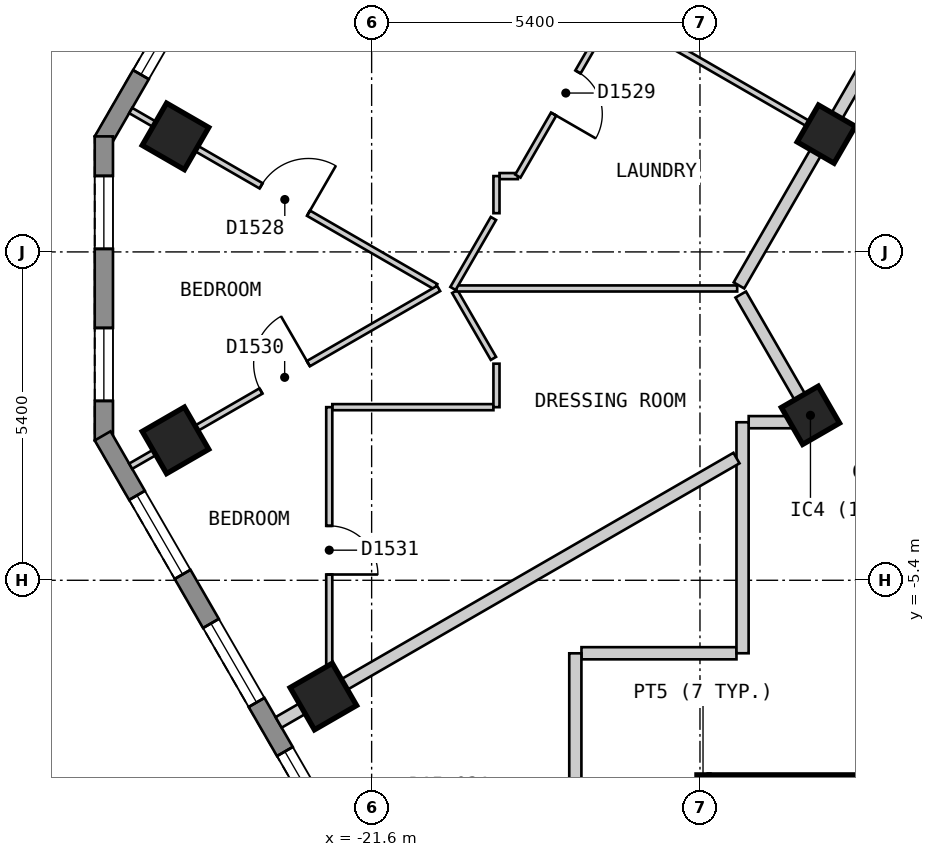
"""IFC4 building model, lengths in metres.
Left out: names, types, materials, properties, quantities, classifications, styles, units other than length and angle.
Written with IfcOpenShell. Run it as: python <this file> out.ifc"""

import sys

from ifc_helpers import new_model, si_unit, direction, frame, frame_2d, origin, origin_2d, place, context, subcontext, project, spatial, polyline, rectangle, outline, extrude, element, fill, save


model = new_model("IFC4")
c1 = context("Model", 3, precision=1e-05, world=origin(), true_north=direction((0.0, 1.0)))
c2 = subcontext(c1, "Body", "Model", "MODEL_VIEW")
j1 = project(units=[si_unit("LENGTHUNIT", "METRE"), si_unit("PLANEANGLEUNIT", "RADIAN")], contexts=[c1])
p1 = place(None, origin())
s1 = spatial("IfcSite", under=j1, at=p1, CompositionType="ELEMENT")
p2 = place(p1, origin())
s2 = spatial("IfcBuilding", under=s1, at=p2, CompositionType="ELEMENT")
p3 = place(p2, frame((0.0, 0.0, 184.2)))
s3 = spatial("IfcBuildingStorey", under=s2, at=p3, CompositionType="ELEMENT", Elevation=184.2)
for number, where, z_axis, x_axis in (
    (1, (-24.826, 1.9, 0.0), (0.0, 0.0, 1.0), (-0.5, -0.866, 0.0)),
    (2, (-24.826, -3.099, 0.0), (0.0, 0.0, 1.0), (0.5, -0.866, 0.0)),
    (3, (-22.394, -7.312, 0.0), (0.0, 0.0, 1.0), (0.5, -0.866, 0.0)),
):
    element("IfcColumn", number, at=place(p3, frame(where, z_axis=z_axis, x_axis=x_axis)), inside=s3, PredefinedType="COLUMN", context=c2, shape_type="SweptSolid", body=[
        extrude(rectangle(XDim=0.8, YDim=0.8, at=origin_2d()), origin(), (0.0, 0.0, 1.0), 3.0),
    ])
for number, where, z_axis, x_axis in (
    (4, (-14.383, -2.687, 0.0), (0.0, 0.0, 1.0), (0.5, -0.866, 0.0)),
    (5, (-14.123, 1.937, 0.0), (0.0, 0.0, 1.0), (-0.5, -0.866, 0.0)),
):
    element("IfcColumn", number, at=place(p3, frame(where, z_axis=z_axis, x_axis=x_axis)), inside=s3, PredefinedType="COLUMN", context=c2, shape_type="SweptSolid", body=[
        extrude(rectangle(XDim=0.7, YDim=0.7, at=origin_2d()), origin(), (0.0, 0.0, 1.0), 3.0),
    ])
p4 = place(p3, frame((-14.592, 21.625, 0.0), z_axis=(0.0, 0.0, 1.0), x_axis=(-0.500010537973, -0.866019319597, 0.0)))
e6 = element("IfcWall", 6, at=p4, inside=s3, PredefinedType="SOLIDWALL", context=c2, shape_type="SweptSolid", body=[
    extrude(outline(polyline([(0.0, -0.15), (22.863, -0.15), (22.783, 0.15), (0.08, 0.15), (0.0, -0.15)])), origin(), (0.0, 0.0, 1.0), 2.7),
])
p5 = place(p4, frame((1.259, 0.0, 0.15)))
e7 = element("IfcOpeningElement", 7, at=p5, cuts=e6, PredefinedType="OPENING", context=c2, shape_type="SweptSolid", body=[
    extrude(rectangle(XDim=1.5, YDim=2.1, at=frame_2d((0.75, 1.05))), frame((0.0, 0.16, 0.0), z_axis=(0.0, -1.0, 0.0), x_axis=(1.0, 0.0, 0.0)), (0.0, 0.0, 1.0), 0.32),
])
p6 = place(p4, frame((3.952, 0.0, 0.15)))
e8 = element("IfcOpeningElement", 8, at=p6, cuts=e6, PredefinedType="OPENING", context=c2, shape_type="SweptSolid", body=[
    extrude(rectangle(XDim=1.5, YDim=2.1, at=frame_2d((0.75, 1.05))), frame((0.0, 0.16, 0.0), z_axis=(0.0, -1.0, 0.0), x_axis=(1.0, 0.0, 0.0)), (0.0, 0.0, 1.0), 0.32),
])
p7 = place(p4, frame((6.644, 0.0, 0.15)))
e9 = element("IfcOpeningElement", 9, at=p7, cuts=e6, PredefinedType="OPENING", context=c2, shape_type="SweptSolid", body=[
    extrude(rectangle(XDim=1.5, YDim=2.1, at=frame_2d((0.75, 1.05))), frame((0.0, 0.16, 0.0), z_axis=(0.0, -1.0, 0.0), x_axis=(1.0, 0.0, 0.0)), (0.0, 0.0, 1.0), 0.32),
])
p8 = place(p4, frame((9.335, 0.0, 0.15)))
e10 = element("IfcOpeningElement", 10, at=p8, cuts=e6, PredefinedType="OPENING", context=c2, shape_type="SweptSolid", body=[
    extrude(rectangle(XDim=1.5, YDim=2.1, at=frame_2d((0.75, 1.05))), frame((0.0, 0.16, 0.0), z_axis=(0.0, -1.0, 0.0), x_axis=(1.0, 0.0, 0.0)), (0.0, 0.0, 1.0), 0.32),
])
p9 = place(p4, frame((12.028, 0.0, 0.15)))
e11 = element("IfcOpeningElement", 11, at=p9, cuts=e6, PredefinedType="OPENING", context=c2, shape_type="SweptSolid", body=[
    extrude(rectangle(XDim=1.5, YDim=2.1, at=frame_2d((0.75, 1.05))), frame((0.0, 0.16, 0.0), z_axis=(0.0, -1.0, 0.0), x_axis=(1.0, 0.0, 0.0)), (0.0, 0.0, 1.0), 0.32),
])
p10 = place(p4, frame((14.72, 0.0, 0.15)))
e12 = element("IfcOpeningElement", 12, at=p10, cuts=e6, PredefinedType="OPENING", context=c2, shape_type="SweptSolid", body=[
    extrude(rectangle(XDim=1.5, YDim=2.1, at=frame_2d((0.75, 1.05))), frame((0.0, 0.16, 0.0), z_axis=(0.0, -1.0, 0.0), x_axis=(1.0, 0.0, 0.0)), (0.0, 0.0, 1.0), 0.32),
])
p11 = place(p4, frame((17.411, 0.0, 0.15)))
e13 = element("IfcOpeningElement", 13, at=p11, cuts=e6, PredefinedType="OPENING", context=c2, shape_type="SweptSolid", body=[
    extrude(rectangle(XDim=1.5, YDim=2.1, at=frame_2d((0.75, 1.05))), frame((0.0, 0.16, 0.0), z_axis=(0.0, -1.0, 0.0), x_axis=(1.0, 0.0, 0.0)), (0.0, 0.0, 1.0), 0.32),
])
p12 = place(p4, frame((20.104, 0.0, 0.15)))
e14 = element("IfcOpeningElement", 14, at=p12, cuts=e6, PredefinedType="OPENING", context=c2, shape_type="SweptSolid", body=[
    extrude(rectangle(XDim=1.5, YDim=2.1, at=frame_2d((0.75, 1.05))), frame((0.0, 0.16, 0.0), z_axis=(0.0, -1.0, 0.0), x_axis=(1.0, 0.0, 0.0)), (0.0, 0.0, 1.0), 0.32),
])
p13 = place(p3, frame((-26.004, 1.9, 0.0), z_axis=(0.0, 0.0, 1.0), x_axis=(0.0, -1.0, 0.0)))
e15 = element("IfcWall", 15, at=p13, inside=s3, PredefinedType="SOLIDWALL", context=c2, shape_type="SweptSolid", body=[
    extrude(outline(polyline([(0.0, -0.15), (5.0, -0.15), (4.92, 0.15), (0.08, 0.15), (0.0, -0.15)])), origin(), (0.0, 0.0, 1.0), 2.7),
])
p14 = place(p13, frame((0.65, 0.0, 0.15)))
e16 = element("IfcOpeningElement", 16, at=p14, cuts=e15, PredefinedType="OPENING", context=c2, shape_type="SweptSolid", body=[
    extrude(rectangle(XDim=1.2, YDim=2.1, at=frame_2d((0.6, 1.05))), frame((0.0, 0.16, 0.0), z_axis=(0.0, -1.0, 0.0), x_axis=(1.0, 0.0, 0.0)), (0.0, 0.0, 1.0), 0.32),
])
p15 = place(p13, frame((3.15, 0.0, 0.15)))
e17 = element("IfcOpeningElement", 17, at=p15, cuts=e15, PredefinedType="OPENING", context=c2, shape_type="SweptSolid", body=[
    extrude(rectangle(XDim=1.2, YDim=2.1, at=frame_2d((0.6, 1.05))), frame((0.0, 0.16, 0.0), z_axis=(0.0, -1.0, 0.0), x_axis=(1.0, 0.0, 0.0)), (0.0, 0.0, 1.0), 0.32),
])
p16 = place(p3, frame((-26.024, -3.025, 0.0), z_axis=(0.0, 0.0, 1.0), x_axis=(0.500018670445, -0.86601462413, 0.0)))
e18 = element("IfcWall", 18, at=p16, inside=s3, PredefinedType="SOLIDWALL", context=c2, shape_type="SweptSolid", body=[
    extrude(outline(polyline([(0.0, -0.15), (20.785, -0.15), (20.705, 0.15), (0.08, 0.15), (0.0, -0.15)])), origin(), (0.0, 0.0, 1.0), 2.7),
])
p17 = place(p16, frame((1.13, 0.0, 0.15)))
e19 = element("IfcOpeningElement", 19, at=p17, cuts=e18, PredefinedType="OPENING", context=c2, shape_type="SweptSolid", body=[
    extrude(rectangle(XDim=1.5, YDim=2.1, at=frame_2d((0.75, 1.05))), frame((0.0, 0.16, 0.0), z_axis=(0.0, -1.0, 0.0), x_axis=(1.0, 0.0, 0.0)), (0.0, 0.0, 1.0), 0.32),
])
p18 = place(p16, frame((3.562, 0.0, 0.15)))
e20 = element("IfcOpeningElement", 20, at=p18, cuts=e18, PredefinedType="OPENING", context=c2, shape_type="SweptSolid", body=[
    extrude(rectangle(XDim=1.5, YDim=2.1, at=frame_2d((0.75, 1.05))), frame((0.0, 0.16, 0.0), z_axis=(0.0, -1.0, 0.0), x_axis=(1.0, 0.0, 0.0)), (0.0, 0.0, 1.0), 0.32),
])
p19 = place(p16, frame((5.994, 0.0, 0.15)))
e21 = element("IfcOpeningElement", 21, at=p19, cuts=e18, PredefinedType="OPENING", context=c2, shape_type="SweptSolid", body=[
    extrude(rectangle(XDim=1.5, YDim=2.1, at=frame_2d((0.75, 1.05))), frame((0.0, 0.16, 0.0), z_axis=(0.0, -1.0, 0.0), x_axis=(1.0, 0.0, 0.0)), (0.0, 0.0, 1.0), 0.32),
])
p20 = place(p16, frame((8.425, 0.0, 0.15)))
e22 = element("IfcOpeningElement", 22, at=p20, cuts=e18, PredefinedType="OPENING", context=c2, shape_type="SweptSolid", body=[
    extrude(rectangle(XDim=1.5, YDim=2.1, at=frame_2d((0.75, 1.05))), frame((0.0, 0.16, 0.0), z_axis=(0.0, -1.0, 0.0), x_axis=(1.0, 0.0, 0.0)), (0.0, 0.0, 1.0), 0.32),
])
p21 = place(p16, frame((10.857, 0.0, 0.15)))
e23 = element("IfcOpeningElement", 23, at=p21, cuts=e18, PredefinedType="OPENING", context=c2, shape_type="SweptSolid", body=[
    extrude(rectangle(XDim=1.5, YDim=2.1, at=frame_2d((0.75, 1.05))), frame((0.0, 0.16, 0.0), z_axis=(0.0, -1.0, 0.0), x_axis=(1.0, 0.0, 0.0)), (0.0, 0.0, 1.0), 0.32),
])
p22 = place(p16, frame((13.289, 0.0, 0.15)))
e24 = element("IfcOpeningElement", 24, at=p22, cuts=e18, PredefinedType="OPENING", context=c2, shape_type="SweptSolid", body=[
    extrude(rectangle(XDim=1.5, YDim=2.1, at=frame_2d((0.75, 1.05))), frame((0.0, 0.16, 0.0), z_axis=(0.0, -1.0, 0.0), x_axis=(1.0, 0.0, 0.0)), (0.0, 0.0, 1.0), 0.32),
])
p23 = place(p16, frame((15.722, 0.0, 0.15)))
e25 = element("IfcOpeningElement", 25, at=p23, cuts=e18, PredefinedType="OPENING", context=c2, shape_type="SweptSolid", body=[
    extrude(rectangle(XDim=1.5, YDim=2.1, at=frame_2d((0.75, 1.05))), frame((0.0, 0.16, 0.0), z_axis=(0.0, -1.0, 0.0), x_axis=(1.0, 0.0, 0.0)), (0.0, 0.0, 1.0), 0.32),
])
p24 = place(p16, frame((18.154, 0.0, 0.15)))
e26 = element("IfcOpeningElement", 26, at=p24, cuts=e18, PredefinedType="OPENING", context=c2, shape_type="SweptSolid", body=[
    extrude(rectangle(XDim=1.5, YDim=2.1, at=frame_2d((0.75, 1.05))), frame((0.0, 0.16, 0.0), z_axis=(0.0, -1.0, 0.0), x_axis=(1.0, 0.0, 0.0)), (0.0, 0.0, 1.0), 0.32),
])
p25 = place(p3, frame((-15.53, -0.701, 0.0), z_axis=(0.0, 0.0, 1.0), x_axis=(0.499972710878, -0.866041158593, 0.0)))
e27 = element("IfcWall", 27, at=p25, inside=s3, PredefinedType="PARTITIONING", context=c2, shape_type="SweptSolid", body=[
    extrude(rectangle(XDim=2.308, YDim=0.2, at=frame_2d((1.154, 0.0))), origin(), (0.0, 0.0, 1.0), 2.7),
])
p26 = place(p3, frame((-18.149, -6.6, 0.0), z_axis=(0.0, 0.0, 1.0), x_axis=(1.0, 0.0, 0.0)))
e28 = element("IfcWall", 28, at=p26, inside=s3, PredefinedType="PARTITIONING", context=c2, shape_type="SweptSolid", body=[
    extrude(rectangle(XDim=2.549, YDim=0.2, at=frame_2d((1.274, 0.0))), origin(), (0.0, 0.0, 1.0), 2.7),
])
p27 = place(p3, frame((-15.399, -2.8, 0.0), z_axis=(0.0, 0.0, 1.0), x_axis=(1.0, 0.0, 0.0)))
e29 = element("IfcWall", 29, at=p27, inside=s3, PredefinedType="PARTITIONING", context=c2, shape_type="SweptSolid", body=[
    extrude(rectangle(XDim=1.081, YDim=0.2, at=frame_2d((0.541, 0.0))), origin(), (0.0, 0.0, 1.0), 2.7),
])
p28 = place(p3, frame((-15.559, -0.551, 0.0), z_axis=(0.0, 0.0, 1.0), x_axis=(0.499964997208, 0.866045611713, 0.0)))
e30 = element("IfcWall", 30, at=p28, inside=s3, PredefinedType="PARTITIONING", context=c2, shape_type="SweptSolid", body=[
    extrude(rectangle(XDim=9.643, YDim=0.2, at=frame_2d((4.821, 0.0))), origin(), (0.0, 0.0, 1.0), 2.7),
])
p29 = place(p28, frame((5.088, 0.0, 0.0)))
e31 = element("IfcOpeningElement", 31, at=p29, cuts=e30, PredefinedType="OPENING", context=c2, shape_type="SweptSolid", body=[
    extrude(rectangle(XDim=1.0, YDim=2.1, at=frame_2d((0.5, 1.05))), frame((0.0, 0.11, 0.0), z_axis=(0.0, -1.0, 0.0), x_axis=(1.0, 0.0, 0.0)), (0.0, 0.0, 1.0), 0.22),
])
p30 = place(p3, frame((-15.5, -6.6, 0.0), z_axis=(0.0, 0.0, 1.0), x_axis=(0.0, 1.0, 0.0)))
e32 = element("IfcWall", 32, at=p30, inside=s3, PredefinedType="PARTITIONING", context=c2, shape_type="SweptSolid", body=[
    extrude(rectangle(XDim=3.799, YDim=0.2, at=frame_2d((1.899, 0.0))), origin(), (0.0, 0.0, 1.0), 2.7),
])
p31 = place(p3, frame((-18.25, -16.152, 0.0), z_axis=(0.0, 0.0, 1.0), x_axis=(0.0, 1.0, 0.0)))
e33 = element("IfcWall", 33, at=p31, inside=s3, PredefinedType="PARTITIONING", context=c2, shape_type="SweptSolid", body=[
    extrude(rectangle(XDim=9.551, YDim=0.2, at=frame_2d((4.775, 0.0))), origin(), (0.0, 0.0, 1.0), 2.7),
])
p32 = place(p31, frame((6.026, 0.0, 0.0)))
e34 = element("IfcOpeningElement", 34, at=p32, cuts=e33, PredefinedType="OPENING", context=c2, shape_type="SweptSolid", body=[
    extrude(rectangle(XDim=0.8, YDim=2.1, at=frame_2d((0.4, 1.05))), frame((0.0, 0.11, 0.0), z_axis=(0.0, -1.0, 0.0), x_axis=(1.0, 0.0, 0.0)), (0.0, 0.0, 1.0), 0.22),
])
p33 = place(p3, frame((-20.233, -0.651, 0.0), z_axis=(0.0, 0.0, 1.0), x_axis=(0.500498449207, -0.865737432679, 0.0)))
e35 = element("IfcWall", 35, at=p33, inside=s3, PredefinedType="PARTITIONING", context=c2, shape_type="SweptSolid", body=[
    extrude(rectangle(XDim=1.271, YDim=0.1, at=frame_2d((0.635, 0.0))), origin(), (0.0, 0.0, 1.0), 2.7),
])
p34 = place(p3, frame((-17.585, 3.936, 0.0), z_axis=(0.0, 0.0, 1.0), x_axis=(0.865979019114, -0.500080332001, 0.0)))
e36 = element("IfcWall", 36, at=p34, inside=s3, PredefinedType="PARTITIONING", context=c2, shape_type="SweptSolid", body=[
    extrude(rectangle(XDim=3.897, YDim=0.1, at=frame_2d((1.949, 0.0))), origin(), (0.0, 0.0, 1.0), 2.7),
])
p35 = place(p3, frame((-25.562, 2.325, 0.0), z_axis=(0.0, 0.0, 1.0), x_axis=(0.86599890761, -0.500045889912, 0.0)))
e37 = element("IfcWall", 37, at=p35, inside=s3, PredefinedType="PARTITIONING", context=c2, shape_type="SweptSolid", body=[
    extrude(rectangle(XDim=5.793, YDim=0.1, at=frame_2d((2.897, 0.0))), origin(), (0.0, 0.0, 1.0), 2.7),
])
p36 = place(p35, frame((2.476, 0.0, 0.0)))
e38 = element("IfcOpeningElement", 38, at=p36, cuts=e37, PredefinedType="OPENING", context=c2, shape_type="SweptSolid", body=[
    extrude(rectangle(XDim=0.9, YDim=2.1, at=frame_2d((0.45, 1.05))), frame((0.0, 0.06, 0.0), z_axis=(0.0, -1.0, 0.0), x_axis=(1.0, 0.0, 0.0)), (0.0, 0.0, 1.0), 0.12),
])
p37 = place(p3, frame((-20.204, -0.601, 0.0), z_axis=(0.0, 0.0, 1.0), x_axis=(1.0, 0.0, 0.0)))
e39 = element("IfcWall", 39, at=p37, inside=s3, PredefinedType="PARTITIONING", context=c2, shape_type="SweptSolid", body=[
    extrude(rectangle(XDim=4.616, YDim=0.1, at=frame_2d((2.308, 0.0))), origin(), (0.0, 0.0, 1.0), 2.7),
])
p38 = place(p3, frame((-22.247, -2.553, 0.0), z_axis=(0.0, 0.0, 1.0), x_axis=(1.0, 0.0, 0.0)))
e40 = element("IfcWall", 40, at=p38, inside=s3, PredefinedType="PARTITIONING", context=c2, shape_type="SweptSolid", body=[
    extrude(rectangle(XDim=2.65, YDim=0.1, at=frame_2d((1.325, 0.0))), origin(), (0.0, 0.0, 1.0), 2.7),
])
p39 = place(p3, frame((-19.497, 1.247, 0.0), z_axis=(0.0, 0.0, 1.0), x_axis=(1.0, 0.0, 0.0)))
e41 = element("IfcWall", 41, at=p39, inside=s3, PredefinedType="PARTITIONING", context=c2, shape_type="SweptSolid", body=[
    extrude(rectangle(XDim=0.302, YDim=0.1, at=frame_2d((0.151, 0.0))), origin(), (0.0, 0.0, 1.0), 2.7),
])
p40 = place(p3, frame((-20.262, -0.601, 0.0), z_axis=(0.0, 0.0, 1.0), x_axis=(0.500247001515, 0.86588275042, 0.0)))
e42 = element("IfcWall", 42, at=p40, inside=s3, PredefinedType="PARTITIONING", context=c2, shape_type="SweptSolid", body=[
    extrude(rectangle(XDim=1.329, YDim=0.1, at=frame_2d((0.665, 0.0))), origin(), (0.0, 0.0, 1.0), 2.7),
])
p41 = place(p3, frame((-19.195, 1.247, 0.0), z_axis=(0.0, 0.0, 1.0), x_axis=(0.499959862915, 0.866048575701, 0.0)))
e43 = element("IfcWall", 43, at=p41, inside=s3, PredefinedType="PARTITIONING", context=c2, shape_type="SweptSolid", body=[
    extrude(rectangle(XDim=7.566, YDim=0.1, at=frame_2d((3.783, 0.0))), origin(), (0.0, 0.0, 1.0), 2.7),
])
p42 = place(p41, frame((5.354, 0.0, 0.0)))
e44 = element("IfcOpeningElement", 44, at=p42, cuts=e43, PredefinedType="OPENING", context=c2, shape_type="SweptSolid", body=[
    extrude(rectangle(XDim=0.9, YDim=2.1, at=frame_2d((0.45, 1.05))), frame((0.0, 0.06, 0.0), z_axis=(0.0, -1.0, 0.0), x_axis=(1.0, 0.0, 0.0)), (0.0, 0.0, 1.0), 0.12),
])
p43 = place(p41, frame((1.177, 0.0, 0.0)))
e45 = element("IfcOpeningElement", 45, at=p43, cuts=e43, PredefinedType="OPENING", context=c2, shape_type="SweptSolid", body=[
    extrude(rectangle(XDim=0.8, YDim=2.1, at=frame_2d((0.4, 1.05))), frame((0.0, 0.06, 0.0), z_axis=(0.0, -1.0, 0.0), x_axis=(1.0, 0.0, 0.0)), (0.0, 0.0, 1.0), 0.12),
])
p44 = place(p3, frame((-19.547, -2.553, 0.0), z_axis=(0.0, 0.0, 1.0), x_axis=(0.0, 1.0, 0.0)))
e46 = element("IfcWall", 46, at=p44, inside=s3, PredefinedType="PARTITIONING", context=c2, shape_type="SweptSolid", body=[
    extrude(rectangle(XDim=0.715, YDim=0.1, at=frame_2d((0.357, 0.0))), origin(), (0.0, 0.0, 1.0), 2.7),
])
p45 = place(p3, frame((-19.547, 0.637, 0.0), z_axis=(0.0, 0.0, 1.0), x_axis=(0.0, 1.0, 0.0)))
e47 = element("IfcWall", 47, at=p45, inside=s3, PredefinedType="PARTITIONING", context=c2, shape_type="SweptSolid", body=[
    extrude(rectangle(XDim=0.61, YDim=0.1, at=frame_2d((0.305, 0.0))), origin(), (0.0, 0.0, 1.0), 2.7),
])
p46 = place(p3, frame((-22.297, -7.141, 0.0), z_axis=(0.0, 0.0, 1.0), x_axis=(0.0, 1.0, 0.0)))
e48 = element("IfcWall", 48, at=p46, inside=s3, PredefinedType="PARTITIONING", context=c2, shape_type="SweptSolid", body=[
    extrude(rectangle(XDim=4.588, YDim=0.1, at=frame_2d((2.294, 0.0))), origin(), (0.0, 0.0, 1.0), 2.7),
])
p47 = place(p46, frame((1.836, 0.0, 0.0)))
e49 = element("IfcOpeningElement", 49, at=p47, cuts=e48, PredefinedType="OPENING", context=c2, shape_type="SweptSolid", body=[
    extrude(rectangle(XDim=0.8, YDim=2.1, at=frame_2d((0.4, 1.05))), frame((0.0, 0.06, 0.0), z_axis=(0.0, -1.0, 0.0), x_axis=(1.0, 0.0, 0.0)), (0.0, 0.0, 1.0), 0.12),
])
p48 = place(p3, frame((-25.563, -3.524, 0.0), z_axis=(0.0, 0.0, 1.0), x_axis=(0.866128586522, 0.499821239653, 0.0)))
e50 = element("IfcWall", 50, at=p48, inside=s3, PredefinedType="PARTITIONING", context=c2, shape_type="SweptSolid", body=[
    extrude(rectangle(XDim=5.848, YDim=0.1, at=frame_2d((2.924, 0.0))), origin(), (0.0, 0.0, 1.0), 2.7),
])
p49 = place(p48, frame((2.474, 0.0, 0.0)))
e51 = element("IfcOpeningElement", 51, at=p49, cuts=e50, PredefinedType="OPENING", context=c2, shape_type="SweptSolid", body=[
    extrude(rectangle(XDim=0.9, YDim=2.1, at=frame_2d((0.45, 1.05))), frame((0.0, 0.06, 0.0), z_axis=(0.0, -1.0, 0.0), x_axis=(1.0, 0.0, 0.0)), (0.0, 0.0, 1.0), 0.12),
])
p50 = place(p3, frame((-23.13, -7.737, 0.0), z_axis=(0.0, 0.0, 1.0), x_axis=(0.866033148899, 0.499986584829, 0.0)))
e52 = element("IfcWall", 52, at=p50, inside=s3, PredefinedType="PARTITIONING", context=c2, shape_type="SweptSolid", body=[
    extrude(rectangle(XDim=8.695, YDim=0.2, at=frame_2d((4.347, 0.0))), origin(), (0.0, 0.0, 1.0), 2.7),
])
p51 = place(p3, frame((-16.15, -14.4, 0.0), z_axis=(0.0, 0.0, 1.0), x_axis=(0.0, 1.0, 0.0)))
e53 = element("IfcWall", 53, at=p51, inside=s3, PredefinedType="SOLIDWALL", context=c2, shape_type="SweptSolid", body=[
    extrude(rectangle(XDim=5.8, YDim=0.2, at=frame_2d((2.9, 0.0))), origin(), (0.0, 0.0, 1.0), 2.7),
])
p52 = place(p3, frame((-16.05, -8.7, 0.0), z_axis=(0.0, 0.0, 1.0), x_axis=(1.0, 0.0, 0.0)))
e54 = element("IfcWall", 54, at=p52, inside=s3, PredefinedType="SOLIDWALL", context=c2, shape_type="SweptSolid", body=[
    extrude(rectangle(XDim=2.75, YDim=0.2, at=frame_2d((1.375, 0.0))), origin(), (0.0, 0.0, 1.0), 2.7),
])
p53 = place(p12, origin())
e55 = element("IfcWindow", 55, at=p53, inside=s3, PartitioningType="SINGLE_PANEL", PredefinedType="WINDOW", context=c2, shape_type="SweptSolid", body=[
    extrude(rectangle(XDim=1.5, YDim=2.1, at=frame_2d((0.75, 1.05))), frame((0.0, 0.03, 0.0), z_axis=(0.0, -1.0, 0.0), x_axis=(1.0, 0.0, 0.0)), (0.0, 0.0, 1.0), 0.06),
])
fill(e14, e55)
p54 = place(p14, origin())
e56 = element("IfcWindow", 56, at=p54, inside=s3, PartitioningType="SINGLE_PANEL", PredefinedType="WINDOW", context=c2, shape_type="SweptSolid", body=[
    extrude(rectangle(XDim=1.2, YDim=2.1, at=frame_2d((0.6, 1.05))), frame((0.0, 0.03, 0.0), z_axis=(0.0, -1.0, 0.0), x_axis=(1.0, 0.0, 0.0)), (0.0, 0.0, 1.0), 0.06),
])
fill(e16, e56)
p55 = place(p15, origin())
e57 = element("IfcWindow", 57, at=p55, inside=s3, PartitioningType="SINGLE_PANEL", PredefinedType="WINDOW", context=c2, shape_type="SweptSolid", body=[
    extrude(rectangle(XDim=1.2, YDim=2.1, at=frame_2d((0.6, 1.05))), frame((0.0, 0.03, 0.0), z_axis=(0.0, -1.0, 0.0), x_axis=(1.0, 0.0, 0.0)), (0.0, 0.0, 1.0), 0.06),
])
fill(e17, e57)
p56 = place(p17, origin())
e58 = element("IfcWindow", 58, at=p56, inside=s3, PartitioningType="SINGLE_PANEL", PredefinedType="WINDOW", context=c2, shape_type="SweptSolid", body=[
    extrude(rectangle(XDim=1.5, YDim=2.1, at=frame_2d((0.75, 1.05))), frame((0.0, 0.03, 0.0), z_axis=(0.0, -1.0, 0.0), x_axis=(1.0, 0.0, 0.0)), (0.0, 0.0, 1.0), 0.06),
])
fill(e19, e58)
p57 = place(p18, origin())
e59 = element("IfcWindow", 59, at=p57, inside=s3, PartitioningType="SINGLE_PANEL", PredefinedType="WINDOW", context=c2, shape_type="SweptSolid", body=[
    extrude(rectangle(XDim=1.5, YDim=2.1, at=frame_2d((0.75, 1.05))), frame((0.0, 0.03, 0.0), z_axis=(0.0, -1.0, 0.0), x_axis=(1.0, 0.0, 0.0)), (0.0, 0.0, 1.0), 0.06),
])
fill(e20, e59)
p58 = place(p19, origin())
e60 = element("IfcWindow", 60, at=p58, inside=s3, PartitioningType="SINGLE_PANEL", PredefinedType="WINDOW", context=c2, shape_type="SweptSolid", body=[
    extrude(rectangle(XDim=1.5, YDim=2.1, at=frame_2d((0.75, 1.05))), frame((0.0, 0.03, 0.0), z_axis=(0.0, -1.0, 0.0), x_axis=(1.0, 0.0, 0.0)), (0.0, 0.0, 1.0), 0.06),
])
fill(e21, e60)
p59 = place(p36, origin())
e61 = element("IfcDoor", 61, at=p59, inside=s3, OperationType="SINGLE_SWING_RIGHT", PredefinedType="DOOR", context=c2, shape_type="SweptSolid", body=[
    extrude(rectangle(XDim=0.9, YDim=2.1, at=frame_2d((0.45, 1.05))), frame((0.0, 0.025, 0.0), z_axis=(0.0, -1.0, 0.0), x_axis=(1.0, 0.0, 0.0)), (0.0, 0.0, 1.0), 0.05),
])
fill(e38, e61)
p60 = place(p43, origin())
e62 = element("IfcDoor", 62, at=p60, inside=s3, OperationType="SINGLE_SWING_LEFT", PredefinedType="DOOR", context=c2, shape_type="SweptSolid", body=[
    extrude(rectangle(XDim=0.8, YDim=2.1, at=frame_2d((0.4, 1.05))), frame((0.0, 0.025, 0.0), z_axis=(0.0, -1.0, 0.0), x_axis=(1.0, 0.0, 0.0)), (0.0, 0.0, 1.0), 0.05),
])
fill(e45, e62)
p61 = place(p49, origin())
e63 = element("IfcDoor", 63, at=p61, inside=s3, OperationType="SINGLE_SWING_RIGHT", PredefinedType="DOOR", context=c2, shape_type="SweptSolid", body=[
    extrude(rectangle(XDim=0.9, YDim=2.1, at=frame_2d((0.45, 1.05))), frame((0.0, 0.025, 0.0), z_axis=(0.0, -1.0, 0.0), x_axis=(1.0, 0.0, 0.0)), (0.0, 0.0, 1.0), 0.05),
])
fill(e51, e63)
p62 = place(p47, origin())
e64 = element("IfcDoor", 64, at=p62, inside=s3, OperationType="SINGLE_SWING_LEFT", PredefinedType="DOOR", context=c2, shape_type="SweptSolid", body=[
    extrude(rectangle(XDim=0.8, YDim=2.1, at=frame_2d((0.4, 1.05))), frame((0.0, 0.025, 0.0), z_axis=(0.0, -1.0, 0.0), x_axis=(1.0, 0.0, 0.0)), (0.0, 0.0, 1.0), 0.05),
])
fill(e49, e64)
save(model, sys.argv[1])
